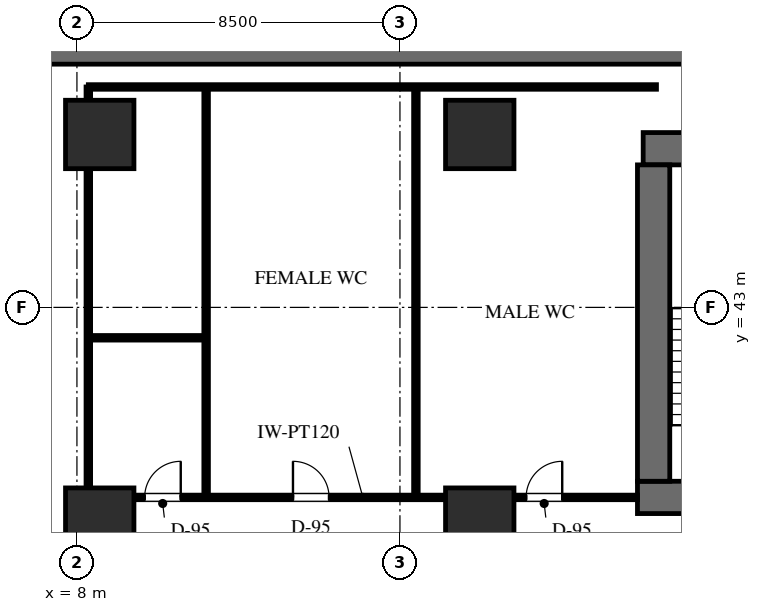
"""IFC4 building model, lengths in metres.
Left out: names, types, materials, properties, quantities, classifications, styles, units other than length and angle.
Written with IfcOpenShell. Run it as: python <this file> out.ifc"""

import sys

from ifc_helpers import new_model, si_unit, direction, frame, frame_2d, origin, origin_2d, place, context, subcontext, project, spatial, rectangle, extrude, element, fill, save


model = new_model("IFC4")
c1 = context("Model", 3, precision=1e-05, world=origin(), true_north=direction((0.0, 1.0)))
c2 = subcontext(c1, "Body", "Model", "MODEL_VIEW")
j1 = project(units=[si_unit("LENGTHUNIT", "METRE"), si_unit("PLANEANGLEUNIT", "RADIAN")], contexts=[c1])
p1 = place(None, origin())
s1 = spatial("IfcSite", under=j1, at=p1, CompositionType="ELEMENT")
p2 = place(p1, origin())
s2 = spatial("IfcBuilding", under=s1, at=p2, CompositionType="ELEMENT")
p3 = place(p2, frame((0.0, 0.0, -8.4)))
s3 = spatial("IfcBuildingStorey", under=s2, at=p3, CompositionType="ELEMENT", Elevation=-8.4)
p4 = place(p3, frame((22.9, 47.175, 0.0), z_axis=(0.0, 0.0, 1.0), x_axis=(1.0, 0.0, 0.0)))
e1 = element("IfcWall", 1, at=p4, inside=s3, PredefinedType="SHEAR", context=c2, shape_type="SweptSolid", body=[
    extrude(rectangle(XDim=43.8, YDim=0.85, at=frame_2d((21.9, 0.0))), origin(), (0.0, 0.0, 1.0), 4.2),
])
p5 = place(p3, frame((22.75, 38.0, 0.0), z_axis=(0.0, 0.0, 1.0), x_axis=(1.0, 0.0, 0.0)))
e2 = element("IfcWall", 2, at=p5, inside=s3, PredefinedType="SHEAR", context=c2, shape_type="SweptSolid", body=[
    extrude(rectangle(XDim=4.3, YDim=0.85, at=frame_2d((2.15, 0.0))), origin(), (0.0, 0.0, 1.0), 4.2),
])
p6 = place(p5, frame((1.7, 0.0, 0.0)))
e3 = element("IfcOpeningElement", 3, at=p6, cuts=e2, PredefinedType="OPENING", context=c2, shape_type="SweptSolid", body=[
    extrude(rectangle(XDim=1.1, YDim=2.2, at=frame_2d((0.55, 1.1))), frame((0.0, 0.435, 0.0), z_axis=(0.0, -1.0, 0.0), x_axis=(1.0, 0.0, 0.0)), (0.0, 0.0, 1.0), 0.87),
])
p7 = place(p3, frame((23.175, 38.425, 0.0), z_axis=(0.0, 0.0, 1.0), x_axis=(0.0, 1.0, 0.0)))
e4 = element("IfcWall", 4, at=p7, inside=s3, PredefinedType="SHEAR", context=c2, shape_type="SweptSolid", body=[
    extrude(rectangle(XDim=8.325, YDim=0.85, at=frame_2d((4.163, 0.0))), origin(), (0.0, 0.0, 1.0), 4.2),
])
p8 = place(p3, frame((0.0, 49.7, 0.0), z_axis=(0.0, 0.0, 1.0), x_axis=(1.0, 0.0, 0.0)))
e5 = element("IfcWall", 5, at=p8, inside=s3, PredefinedType="SOLIDWALL", context=c2, shape_type="SweptSolid", body=[
    extrude(rectangle(XDim=74.0, YDim=0.6, at=frame_2d((37.0, 0.0))), origin(), (0.0, 0.0, 1.0), 4.2),
])
for number, where, z_axis, x_axis in (
    (6, (18.6, 37.35, 0.0), (0.0, 0.0, 1.0), (1.0, 0.0, 0.0)),
    (7, (18.6, 47.55, 0.0), (0.0, 0.0, 1.0), (1.0, 0.0, 0.0)),
    (8, (8.6, 37.35, 0.0), (0.0, 0.0, 1.0), (1.0, 0.0, 0.0)),
    (9, (8.6, 47.55, 0.0), (0.0, 0.0, 1.0), (1.0, 0.0, 0.0)),
):
    element("IfcColumn", number, at=place(p3, frame(where, z_axis=z_axis, x_axis=x_axis)), inside=s3, PredefinedType="COLUMN", context=c2, shape_type="SweptSolid", body=[
        extrude(rectangle(XDim=1.8, YDim=1.8, at=origin_2d()), origin(), (0.0, 0.0, 1.0), 4.2),
    ])
p9 = place(p3, frame((8.2, 34.4, 0.0), z_axis=(0.0, 0.0, 1.0), x_axis=(0.0, 1.0, 0.0)))
e10 = element("IfcWall", 10, at=p9, inside=s3, PredefinedType="STANDARD", context=c2, shape_type="SweptSolid", body=[
    extrude(rectangle(XDim=3.65, YDim=0.18, at=frame_2d((1.825, 0.0))), origin(), (0.0, 0.0, 1.0), 2.952),
])
p10 = place(p3, frame((8.3, 38.0, 0.0), z_axis=(0.0, 0.0, 1.0), x_axis=(1.0, 0.0, 0.0)))
e11 = element("IfcWall", 11, at=p10, inside=s3, PredefinedType="PARTITIONING", context=c2, shape_type="SweptSolid", body=[
    extrude(rectangle(XDim=14.45, YDim=0.12, at=frame_2d((7.225, 0.0))), origin(), (0.0, 0.0, 1.0), 2.952),
])
p11 = place(p10, frame((1.482, 0.0, 0.0)))
e12 = element("IfcOpeningElement", 12, at=p11, cuts=e11, PredefinedType="OPENING", context=c2, shape_type="SweptSolid", body=[
    extrude(rectangle(XDim=0.95, YDim=2.15, at=frame_2d((0.475, 1.075))), frame((0.0, 0.07, 0.0), z_axis=(0.0, -1.0, 0.0), x_axis=(1.0, 0.0, 0.0)), (0.0, 0.0, 1.0), 0.14),
])
p12 = place(p10, frame((5.385, 0.0, 0.0)))
e13 = element("IfcOpeningElement", 13, at=p12, cuts=e11, PredefinedType="OPENING", context=c2, shape_type="SweptSolid", body=[
    extrude(rectangle(XDim=0.95, YDim=2.15, at=frame_2d((0.475, 1.075))), frame((0.0, 0.07, 0.0), z_axis=(0.0, -1.0, 0.0), x_axis=(1.0, 0.0, 0.0)), (0.0, 0.0, 1.0), 0.14),
])
p13 = place(p10, frame((11.52, 0.0, 0.0)))
e14 = element("IfcOpeningElement", 14, at=p13, cuts=e11, PredefinedType="OPENING", context=c2, shape_type="SweptSolid", body=[
    extrude(rectangle(XDim=0.95, YDim=2.15, at=frame_2d((0.475, 1.075))), frame((0.0, 0.07, 0.0), z_axis=(0.0, -1.0, 0.0), x_axis=(1.0, 0.0, 0.0)), (0.0, 0.0, 1.0), 0.14),
])
p14 = place(p3, frame((8.3, 38.0, 0.0), z_axis=(0.0, 0.0, 1.0), x_axis=(0.0, 1.0, 0.0)))
e15 = element("IfcWall", 15, at=p14, inside=s3, PredefinedType="PARTITIONING", context=c2, shape_type="SweptSolid", body=[
    extrude(rectangle(XDim=10.8, YDim=0.12, at=frame_2d((5.4, 0.0))), origin(), (0.0, 0.0, 1.0), 2.952),
])
p15 = place(p3, frame((8.3, 48.8, 0.0), z_axis=(0.0, 0.0, 1.0), x_axis=(1.0, 0.0, 0.0)))
e16 = element("IfcWall", 16, at=p15, inside=s3, PredefinedType="PARTITIONING", context=c2, shape_type="SweptSolid", body=[
    extrude(rectangle(XDim=14.95, YDim=0.12, at=frame_2d((7.475, 0.0))), origin(), (0.0, 0.0, 1.0), 3.9),
])
for number, where, z_axis, x_axis in (
    (17, (11.4, 38.068, 0.0), (0.0, 0.0, 1.0), (0.0, 1.0, 0.0)),
    (18, (16.92, 38.068, 0.0), (0.0, 0.0, 1.0), (0.0, 1.0, 0.0)),
):
    element("IfcWall", number, at=place(p3, frame(where, z_axis=z_axis, x_axis=x_axis)), inside=s3, PredefinedType="PARTITIONING", context=c2, shape_type="SweptSolid", body=[
        extrude(rectangle(XDim=10.664, YDim=0.12, at=frame_2d((5.332, 0.0))), origin(), (0.0, 0.0, 1.0), 2.952),
    ])
p16 = place(p3, frame((8.368, 42.2, 0.0), z_axis=(0.0, 0.0, 1.0), x_axis=(1.0, 0.0, 0.0)))
e19 = element("IfcWall", 19, at=p16, inside=s3, PredefinedType="PARTITIONING", context=c2, shape_type="SweptSolid", body=[
    extrude(rectangle(XDim=2.964, YDim=0.12, at=frame_2d((1.482, 0.0))), origin(), (0.0, 0.0, 1.0), 2.952),
])
p17 = place(p11, origin())
e20 = element("IfcDoor", 20, at=p17, inside=s3, OperationType="SINGLE_SWING_RIGHT", PredefinedType="DOOR", context=c2, shape_type="SweptSolid", body=[
    extrude(rectangle(XDim=0.95, YDim=2.15, at=frame_2d((0.475, 1.075))), frame((0.0, 0.025, 0.0), z_axis=(0.0, -1.0, 0.0), x_axis=(1.0, 0.0, 0.0)), (0.0, 0.0, 1.0), 0.05),
])
fill(e12, e20)
p18 = place(p12, origin())
e21 = element("IfcDoor", 21, at=p18, inside=s3, OperationType="SINGLE_SWING_LEFT", PredefinedType="DOOR", context=c2, shape_type="SweptSolid", body=[
    extrude(rectangle(XDim=0.95, YDim=2.15, at=frame_2d((0.475, 1.075))), frame((0.0, 0.025, 0.0), z_axis=(0.0, -1.0, 0.0), x_axis=(1.0, 0.0, 0.0)), (0.0, 0.0, 1.0), 0.05),
])
fill(e13, e21)
p19 = place(p13, origin())
e22 = element("IfcDoor", 22, at=p19, inside=s3, OperationType="SINGLE_SWING_RIGHT", PredefinedType="DOOR", context=c2, shape_type="SweptSolid", body=[
    extrude(rectangle(XDim=0.95, YDim=2.15, at=frame_2d((0.475, 1.075))), frame((0.0, 0.025, 0.0), z_axis=(0.0, -1.0, 0.0), x_axis=(1.0, 0.0, 0.0)), (0.0, 0.0, 1.0), 0.05),
])
fill(e14, e22)
save(model, sys.argv[1])
